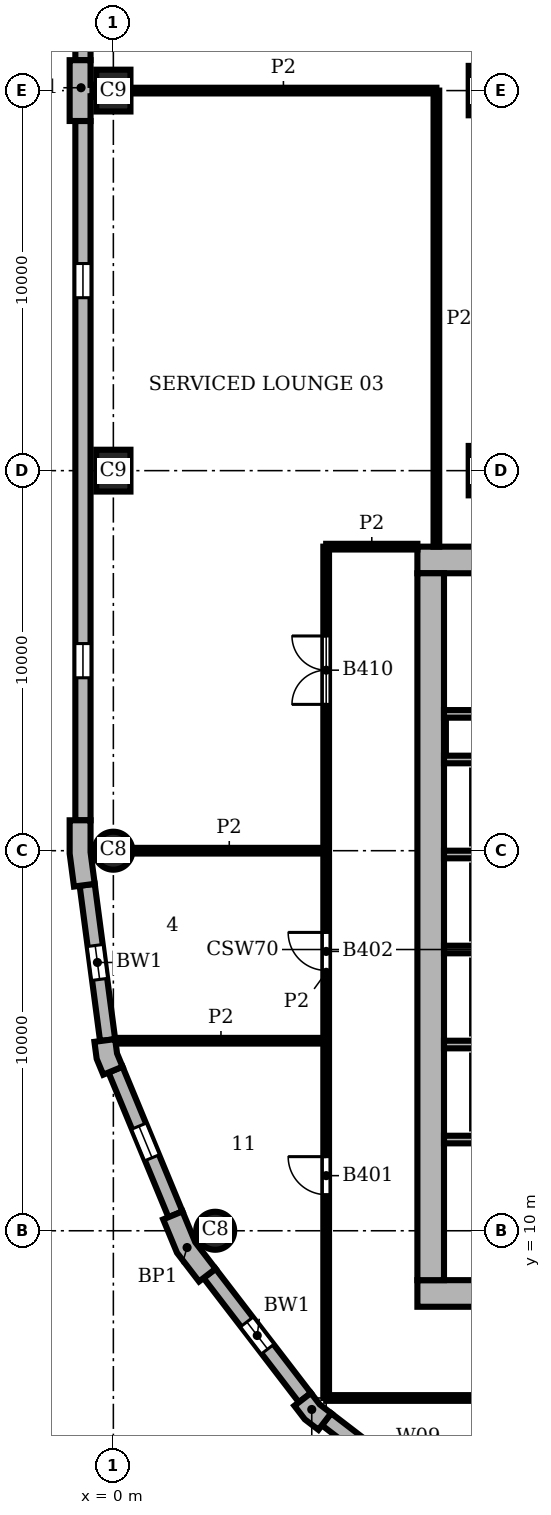
"""IFC4 building model, lengths in metres.
Left out: names, types, materials, properties, quantities, classifications, styles, units other than length and angle.
Written with IfcOpenShell. Run it as: python <this file> out.ifc"""

import sys

from ifc_helpers import new_model, si_unit, direction, frame, frame_2d, origin, origin_2d, place, context, subcontext, project, spatial, polyline, rectangle, circle, outline, extrude, element, fill, save


model = new_model("IFC4")
c1 = context("Model", 3, precision=1e-05, world=origin(), true_north=direction((0.0, 1.0)))
c2 = subcontext(c1, "Body", "Model", "MODEL_VIEW")
j1 = project(units=[si_unit("LENGTHUNIT", "METRE"), si_unit("PLANEANGLEUNIT", "RADIAN")], contexts=[c1])
p1 = place(None, origin())
s1 = spatial("IfcSite", under=j1, at=p1, CompositionType="ELEMENT")
p2 = place(p1, origin())
s2 = spatial("IfcBuilding", under=s1, at=p2, CompositionType="ELEMENT")
p3 = place(p2, frame((0.0, 0.0, 170.7)))
s3 = spatial("IfcBuildingStorey", under=s2, at=p3, CompositionType="ELEMENT", Elevation=170.7)
for number, where, z_axis, x_axis in (
    (1, (0.0, 40.0, 0.0), (0.0, 0.0, 1.0), (0.0, 1.0, 0.0)),
    (2, (0.0, 30.0, 0.0), (0.0, 0.0, 1.0), (0.0, 1.0, 0.0)),
):
    element("IfcColumn", number, at=place(p3, frame(where, z_axis=z_axis, x_axis=x_axis)), inside=s3, PredefinedType="COLUMN", context=c2, shape_type="SweptSolid", body=[
        extrude(rectangle(XDim=1.1, YDim=0.9, at=origin_2d()), origin(), (0.0, 0.0, 1.0), 3.9),
    ])
for number, where, z_axis, x_axis in (
    (3, (0.0, 20.0, 0.0), (0.0, 0.0, 1.0), (1.0, 0.0, 0.0)),
    (4, (2.679, 10.0, 0.0), (0.0, 0.0, 1.0), (1.0, 0.0, 0.0)),
):
    element("IfcColumn", number, at=place(p3, frame(where, z_axis=z_axis, x_axis=x_axis)), inside=s3, PredefinedType="COLUMN", context=c2, shape_type="SweptSolid", body=[
        extrude(circle(Radius=0.5, at=origin_2d()), origin(), (0.0, 0.0, 1.0), 3.9),
    ])
for number, where, z_axis, x_axis in (
    (5, (10.0, 30.0, 0.0), (0.0, 0.0, 1.0), (1.0, 0.0, 0.0)),
    (6, (10.0, 40.0, 0.0), (0.0, 0.0, 1.0), (1.0, 0.0, 0.0)),
):
    element("IfcColumn", number, at=place(p3, frame(where, z_axis=z_axis, x_axis=x_axis)), inside=s3, PredefinedType="COLUMN", context=c2, shape_type="SweptSolid", body=[
        extrude(rectangle(XDim=1.3, YDim=1.3, at=origin_2d()), origin(), (0.0, 0.0, 1.0), 3.9),
    ])
for number, where, z_axis, x_axis in (
    (7, (8.0, 8.35, 0.0), (0.0, 0.0, 1.0), (1.0, 0.0, 0.0)),
    (8, (28.0, 27.65, 0.0), (0.0, 0.0, 1.0), (-1.0, 0.0, 0.0)),
):
    element("IfcWall", number, at=place(p3, frame(where, z_axis=z_axis, x_axis=x_axis)), inside=s3, PredefinedType="SHEAR", context=c2, shape_type="SweptSolid", body=[
        extrude(rectangle(XDim=20.0, YDim=0.7, at=frame_2d((10.0, 0.0))), origin(), (0.0, 0.0, 1.0), 3.9),
    ])
p4 = place(p3, frame((8.35, 27.3, 0.0), z_axis=(0.0, 0.0, 1.0), x_axis=(0.0, -1.0, 0.0)))
e9 = element("IfcWall", 9, at=p4, inside=s3, PredefinedType="SHEAR", context=c2, shape_type="SweptSolid", body=[
    extrude(rectangle(XDim=18.6, YDim=0.7, at=frame_2d((9.3, 0.0))), origin(), (0.0, 0.0, 1.0), 3.9),
])
p5 = place(p3, origin())
e10 = element("IfcWall", 10, at=p5, inside=s3, PredefinedType="SOLIDWALL", context=c2, shape_type="SweptSolid", body=[
    extrude(outline(polyline([(-0.6, 39.2), (-0.6, 39.85), (-0.55, 39.85), (-0.55, 40.15), (-0.6, 40.15), (-0.6, 40.8), (-1.0, 40.8), (-1.15, 40.8), (-1.15, 40.0), (-1.15, 39.2), (-1.0, 39.2), (-0.6, 39.2)])), origin(), (0.0, 0.0, 1.0), 3.9),
])
e11 = element("IfcWall", 11, at=p5, inside=s3, PredefinedType="SOLIDWALL", context=c2, shape_type="SweptSolid", body=[
    extrude(outline(polyline([(-1.0, 20.8), (-1.15, 20.8), (-1.15, 19.925), (-1.036, 19.057), (-0.887, 19.076), (-0.49, 19.128), (-0.6, 19.961), (-0.6, 20.8), (-1.0, 20.8)])), origin(), (0.0, 0.0, 1.0), 3.9),
])
e12 = element("IfcWall", 12, at=p5, inside=s3, PredefinedType="SOLIDWALL", context=c2, shape_type="SweptSolid", body=[
    extrude(outline(polyline([(-0.349, 14.99), (-0.498, 14.971), (-0.439, 14.523), (-0.266, 14.106), (-0.128, 14.164), (0.242, 14.317), (0.097, 14.667), (0.047, 15.043), (-0.349, 14.99)])), origin(), (0.0, 0.0, 1.0), 3.9),
])
e13 = element("IfcWall", 13, at=p5, inside=s3, PredefinedType="SOLIDWALL", context=c2, shape_type="SweptSolid", body=[
    extrude(outline(polyline([(1.449, 10.356), (1.311, 10.299), (1.675, 9.42), (2.254, 8.665), (2.373, 8.757), (2.69, 9.0), (2.155, 9.698), (1.819, 10.51), (1.449, 10.356)])), origin(), (0.0, 0.0, 1.0), 3.9),
])
e14 = element("IfcWall", 14, at=p5, inside=s3, PredefinedType="SOLIDWALL", context=c2, shape_type="SweptSolid", body=[
    extrude(outline(polyline([(4.882, 5.487), (4.763, 5.396), (5.038, 5.038), (5.396, 4.763), (5.487, 4.882), (5.731, 5.199), (5.43, 5.43), (5.199, 5.731), (4.882, 5.487)])), origin(), (0.0, 0.0, 1.0), 3.9),
])
p6 = place(p3, frame((-0.8, 59.2, 0.0), z_axis=(0.0, 0.0, 1.0), x_axis=(0.0, -1.0, 0.0)))
e15 = element("IfcWall", 15, at=p6, inside=s3, PredefinedType="SOLIDWALL", context=c2, shape_type="SweptSolid", body=[
    extrude(rectangle(XDim=18.4, YDim=0.4, at=frame_2d((9.2, 0.0))), origin(), (0.0, 0.0, 1.0), 3.9),
])
p7 = place(p6, frame((3.75, 0.0, 0.9)))
e16 = element("IfcOpeningElement", 16, at=p7, cuts=e15, PredefinedType="OPENING", context=c2, shape_type="SweptSolid", body=[
    extrude(rectangle(XDim=0.9, YDim=2.35, at=frame_2d((0.45, 1.175))), frame((0.0, 0.21, 0.0), z_axis=(0.0, -1.0, 0.0), x_axis=(1.0, 0.0, 0.0)), (0.0, 0.0, 1.0), 0.42),
])
p8 = place(p6, frame((13.75, 0.0, 0.9)))
e17 = element("IfcOpeningElement", 17, at=p8, cuts=e15, PredefinedType="OPENING", context=c2, shape_type="SweptSolid", body=[
    extrude(rectangle(XDim=0.9, YDim=2.35, at=frame_2d((0.45, 1.175))), frame((0.0, 0.21, 0.0), z_axis=(0.0, -1.0, 0.0), x_axis=(1.0, 0.0, 0.0)), (0.0, 0.0, 1.0), 0.42),
])
p9 = place(p3, frame((-0.8, 39.2, 0.0), z_axis=(0.0, 0.0, 1.0), x_axis=(0.0, -1.0, 0.0)))
e18 = element("IfcWall", 18, at=p9, inside=s3, PredefinedType="SOLIDWALL", context=c2, shape_type="SweptSolid", body=[
    extrude(rectangle(XDim=18.4, YDim=0.4, at=frame_2d((9.2, 0.0))), origin(), (0.0, 0.0, 1.0), 3.9),
])
p10 = place(p9, frame((3.75, 0.0, 0.9)))
e19 = element("IfcOpeningElement", 19, at=p10, cuts=e18, PredefinedType="OPENING", context=c2, shape_type="SweptSolid", body=[
    extrude(rectangle(XDim=0.9, YDim=2.35, at=frame_2d((0.45, 1.175))), frame((0.0, 0.21, 0.0), z_axis=(0.0, -1.0, 0.0), x_axis=(1.0, 0.0, 0.0)), (0.0, 0.0, 1.0), 0.42),
])
p11 = place(p9, frame((13.75, 0.0, 0.9)))
e20 = element("IfcOpeningElement", 20, at=p11, cuts=e18, PredefinedType="OPENING", context=c2, shape_type="SweptSolid", body=[
    extrude(rectangle(XDim=0.9, YDim=2.35, at=frame_2d((0.45, 1.175))), frame((0.0, 0.21, 0.0), z_axis=(0.0, -1.0, 0.0), x_axis=(1.0, 0.0, 0.0)), (0.0, 0.0, 1.0), 0.42),
])
p12 = place(p3, frame((-0.689, 19.102, 0.0), z_axis=(0.0, 0.0, 1.0), x_axis=(0.130514280502, -0.991446429508, 0.0)))
e21 = element("IfcWall", 21, at=p12, inside=s3, PredefinedType="SOLIDWALL", context=c2, shape_type="SweptSolid", body=[
    extrude(rectangle(XDim=4.121, YDim=0.4, at=frame_2d((2.061, 0.0))), origin(), (0.0, 0.0, 1.0), 3.9),
])
p13 = place(p12, frame((1.611, 0.0, 0.9)))
e22 = element("IfcOpeningElement", 22, at=p13, cuts=e21, PredefinedType="OPENING", context=c2, shape_type="SweptSolid", body=[
    extrude(rectangle(XDim=0.9, YDim=2.35, at=frame_2d((0.45, 1.175))), frame((0.0, 0.21, 0.0), z_axis=(0.0, -1.0, 0.0), x_axis=(1.0, 0.0, 0.0)), (0.0, 0.0, 1.0), 0.42),
])
p14 = place(p3, frame((0.057, 14.24, 0.0), z_axis=(0.0, 0.0, 1.0), x_axis=(0.382721546029, -0.923863744394, 0.0)))
e23 = element("IfcWall", 23, at=p14, inside=s3, PredefinedType="SOLIDWALL", context=c2, shape_type="SweptSolid", body=[
    extrude(rectangle(XDim=4.121, YDim=0.4, at=frame_2d((2.061, 0.0))), origin(), (0.0, 0.0, 1.0), 3.9),
])
p15 = place(p14, frame((1.611, 0.0, 0.9)))
e24 = element("IfcOpeningElement", 24, at=p15, cuts=e23, PredefinedType="OPENING", context=c2, shape_type="SweptSolid", body=[
    extrude(rectangle(XDim=0.9, YDim=2.35, at=frame_2d((0.45, 1.175))), frame((0.0, 0.21, 0.0), z_axis=(0.0, -1.0, 0.0), x_axis=(1.0, 0.0, 0.0)), (0.0, 0.0, 1.0), 0.42),
])
p16 = place(p3, frame((2.532, 8.878, 0.0), z_axis=(0.0, 0.0, 1.0), x_axis=(0.608759824817, -0.793354571229, 0.0)))
e25 = element("IfcWall", 25, at=p16, inside=s3, PredefinedType="SOLIDWALL", context=c2, shape_type="SweptSolid", body=[
    extrude(rectangle(XDim=4.121, YDim=0.4, at=frame_2d((2.061, 0.0))), origin(), (0.0, 0.0, 1.0), 3.9),
])
p17 = place(p16, frame((1.611, 0.0, 0.9)))
e26 = element("IfcOpeningElement", 26, at=p17, cuts=e25, PredefinedType="OPENING", context=c2, shape_type="SweptSolid", body=[
    extrude(rectangle(XDim=0.9, YDim=2.35, at=frame_2d((0.45, 1.175))), frame((0.0, 0.21, 0.0), z_axis=(0.0, -1.0, 0.0), x_axis=(1.0, 0.0, 0.0)), (0.0, 0.0, 1.0), 0.42),
])
p18 = place(p3, frame((5.609, 5.041, 0.0), z_axis=(0.0, 0.0, 1.0), x_axis=(0.793354571229, -0.608759824817, 0.0)))
e27 = element("IfcWall", 27, at=p18, inside=s3, PredefinedType="SOLIDWALL", context=c2, shape_type="SweptSolid", body=[
    extrude(rectangle(XDim=4.121, YDim=0.4, at=frame_2d((2.061, 0.0))), origin(), (0.0, 0.0, 1.0), 3.9),
])
p19 = place(p18, frame((1.611, 0.0, 0.9)))
e28 = element("IfcOpeningElement", 28, at=p19, cuts=e27, PredefinedType="OPENING", context=c2, shape_type="SweptSolid", body=[
    extrude(rectangle(XDim=0.9, YDim=2.35, at=frame_2d((0.45, 1.175))), frame((0.0, 0.21, 0.0), z_axis=(0.0, -1.0, 0.0), x_axis=(1.0, 0.0, 0.0)), (0.0, 0.0, 1.0), 0.42),
])
p20 = place(p3, frame((8.7, 12.4, 0.0), z_axis=(0.0, 0.0, 1.0), x_axis=(1.0, 0.0, 0.0)))
e29 = element("IfcWall", 29, at=p20, inside=s3, PredefinedType="SHEAR", context=c2, shape_type="SweptSolid", body=[
    extrude(rectangle(XDim=5.1, YDim=0.2, at=frame_2d((2.55, 0.0))), origin(), (0.0, 0.0, 1.0), 3.58),
])
for number, where, z_axis, x_axis in (
    (30, (8.7, 14.9, 0.0), (0.0, 0.0, 1.0), (1.0, 0.0, 0.0)),
    (31, (8.7, 17.4, 0.0), (0.0, 0.0, 1.0), (1.0, 0.0, 0.0)),
    (32, (8.7, 19.9, 0.0), (0.0, 0.0, 1.0), (1.0, 0.0, 0.0)),
    (33, (8.7, 22.4, 0.0), (0.0, 0.0, 1.0), (1.0, 0.0, 0.0)),
):
    element("IfcWall", number, at=place(p3, frame(where, z_axis=z_axis, x_axis=x_axis)), inside=s3, PredefinedType="SHEAR", context=c2, shape_type="SweptSolid", body=[
        extrude(rectangle(XDim=3.0, YDim=0.2, at=frame_2d((1.5, 0.0))), origin(), (0.0, 0.0, 1.0), 3.58),
    ])
p21 = place(p3, frame((8.7, 23.6, 0.0), z_axis=(0.0, 0.0, 1.0), x_axis=(1.0, 0.0, 0.0)))
e34 = element("IfcWall", 34, at=p21, inside=s3, PredefinedType="SHEAR", context=c2, shape_type="SweptSolid", body=[
    extrude(rectangle(XDim=5.1, YDim=0.2, at=frame_2d((2.55, 0.0))), origin(), (0.0, 0.0, 1.0), 3.58),
])
p22 = place(p3, frame((5.6, 5.6, 0.0), z_axis=(0.0, 0.0, 1.0), x_axis=(0.0, 1.0, 0.0)))
e35 = element("IfcWall", 35, at=p22, inside=s3, PredefinedType="PARTITIONING", context=c2, shape_type="SweptSolid", body=[
    extrude(rectangle(XDim=22.4, YDim=0.15, at=frame_2d((11.2, 0.0))), origin(), (0.0, 0.0, 1.0), 3.58),
])
p23 = place(p22, frame((5.35, 0.0, 0.0)))
e36 = element("IfcOpeningElement", 36, at=p23, cuts=e35, PredefinedType="OPENING", context=c2, shape_type="SweptSolid", body=[
    extrude(rectangle(XDim=1.0, YDim=2.1, at=frame_2d((0.5, 1.05))), frame((0.0, 0.085, 0.0), z_axis=(0.0, -1.0, 0.0), x_axis=(1.0, 0.0, 0.0)), (0.0, 0.0, 1.0), 0.17),
])
p24 = place(p22, frame((11.25, 0.0, 0.0)))
e37 = element("IfcOpeningElement", 37, at=p24, cuts=e35, PredefinedType="OPENING", context=c2, shape_type="SweptSolid", body=[
    extrude(rectangle(XDim=1.0, YDim=2.1, at=frame_2d((0.5, 1.05))), frame((0.0, 0.085, 0.0), z_axis=(0.0, -1.0, 0.0), x_axis=(1.0, 0.0, 0.0)), (0.0, 0.0, 1.0), 0.17),
])
p25 = place(p22, frame((18.25, 0.0, 0.0)))
e38 = element("IfcOpeningElement", 38, at=p25, cuts=e35, PredefinedType="OPENING", context=c2, shape_type="SweptSolid", body=[
    extrude(rectangle(XDim=1.8, YDim=2.1, at=frame_2d((0.9, 1.05))), frame((0.0, 0.085, 0.0), z_axis=(0.0, -1.0, 0.0), x_axis=(1.0, 0.0, 0.0)), (0.0, 0.0, 1.0), 0.17),
])
p26 = place(p3, frame((8.5, 28.0, 0.0), z_axis=(0.0, 0.0, 1.0), x_axis=(0.0, 1.0, 0.0)))
e39 = element("IfcWall", 39, at=p26, inside=s3, PredefinedType="PARTITIONING", context=c2, shape_type="SweptSolid", body=[
    extrude(rectangle(XDim=12.0, YDim=0.15, at=frame_2d((6.0, 0.0))), origin(), (0.0, 0.0, 1.0), 3.58),
])
p27 = place(p3, frame((5.6, 5.6, 0.0), z_axis=(0.0, 0.0, 1.0), x_axis=(1.0, 0.0, 0.0)))
e40 = element("IfcWall", 40, at=p27, inside=s3, PredefinedType="PARTITIONING", context=c2, shape_type="SweptSolid", body=[
    extrude(rectangle(XDim=25.4, YDim=0.15, at=frame_2d((12.7, 0.0))), origin(), (0.0, 0.0, 1.0), 3.58),
])
p28 = place(p27, frame((5.6, 0.0, 0.0)))
e41 = element("IfcOpeningElement", 41, at=p28, cuts=e40, PredefinedType="OPENING", context=c2, shape_type="SweptSolid", body=[
    extrude(rectangle(XDim=1.0, YDim=2.1, at=frame_2d((0.5, 1.05))), frame((0.0, 0.085, 0.0), z_axis=(0.0, -1.0, 0.0), x_axis=(1.0, 0.0, 0.0)), (0.0, 0.0, 1.0), 0.17),
])
p29 = place(p27, frame((11.0, 0.0, 0.0)))
e42 = element("IfcOpeningElement", 42, at=p29, cuts=e40, PredefinedType="OPENING", context=c2, shape_type="SweptSolid", body=[
    extrude(rectangle(XDim=1.0, YDim=2.1, at=frame_2d((0.5, 1.05))), frame((0.0, 0.085, 0.0), z_axis=(0.0, -1.0, 0.0), x_axis=(1.0, 0.0, 0.0)), (0.0, 0.0, 1.0), 0.17),
])
p30 = place(p27, frame((18.75, 0.0, 0.0)))
e43 = element("IfcOpeningElement", 43, at=p30, cuts=e40, PredefinedType="OPENING", context=c2, shape_type="SweptSolid", body=[
    extrude(rectangle(XDim=1.0, YDim=2.1, at=frame_2d((0.5, 1.05))), frame((0.0, 0.085, 0.0), z_axis=(0.0, -1.0, 0.0), x_axis=(1.0, 0.0, 0.0)), (0.0, 0.0, 1.0), 0.17),
])
p31 = place(p3, frame((0.063, 15.0, 0.0), z_axis=(0.0, 0.0, 1.0), x_axis=(1.0, 0.0, 0.0)))
e44 = element("IfcWall", 44, at=p31, inside=s3, PredefinedType="PARTITIONING", context=c2, shape_type="SweptSolid", body=[
    extrude(rectangle(XDim=5.537, YDim=0.15, at=frame_2d((2.769, 0.0))), origin(), (0.0, 0.0, 1.0), 3.58),
])
p32 = place(p3, frame((0.5, 20.0, 0.0), z_axis=(0.0, 0.0, 1.0), x_axis=(1.0, 0.0, 0.0)))
e45 = element("IfcWall", 45, at=p32, inside=s3, PredefinedType="PARTITIONING", context=c2, shape_type="SweptSolid", body=[
    extrude(rectangle(XDim=5.1, YDim=0.15, at=frame_2d((2.55, 0.0))), origin(), (0.0, 0.0, 1.0), 3.58),
])
p33 = place(p3, frame((5.6, 28.0, 0.0), z_axis=(0.0, 0.0, 1.0), x_axis=(1.0, 0.0, 0.0)))
e46 = element("IfcWall", 46, at=p33, inside=s3, PredefinedType="PARTITIONING", context=c2, shape_type="SweptSolid", body=[
    extrude(rectangle(XDim=2.4, YDim=0.15, at=frame_2d((1.2, 0.0))), origin(), (0.0, 0.0, 1.0), 3.58),
])
p34 = place(p3, frame((0.45, 40.0, 0.0), z_axis=(0.0, 0.0, 1.0), x_axis=(1.0, 0.0, 0.0)))
e47 = element("IfcWall", 47, at=p34, inside=s3, PredefinedType="PARTITIONING", context=c2, shape_type="SweptSolid", body=[
    extrude(rectangle(XDim=8.05, YDim=0.15, at=frame_2d((4.025, 0.0))), origin(), (0.0, 0.0, 1.0), 3.58),
])
p35 = place(p10, origin())
e48 = element("IfcWindow", 48, at=p35, inside=s3, PartitioningType="SINGLE_PANEL", PredefinedType="WINDOW", context=c2, shape_type="SweptSolid", body=[
    extrude(rectangle(XDim=0.9, YDim=2.35, at=frame_2d((0.45, 1.175))), frame((0.0, 0.16, 0.0), z_axis=(0.0, -1.0, 0.0), x_axis=(1.0, 0.0, 0.0)), (0.0, 0.0, 1.0), 0.06),
])
fill(e19, e48)
p36 = place(p11, origin())
e49 = element("IfcWindow", 49, at=p36, inside=s3, PartitioningType="SINGLE_PANEL", PredefinedType="WINDOW", context=c2, shape_type="SweptSolid", body=[
    extrude(rectangle(XDim=0.9, YDim=2.35, at=frame_2d((0.45, 1.175))), frame((0.0, 0.16, 0.0), z_axis=(0.0, -1.0, 0.0), x_axis=(1.0, 0.0, 0.0)), (0.0, 0.0, 1.0), 0.06),
])
fill(e20, e49)
p37 = place(p13, origin())
e50 = element("IfcWindow", 50, at=p37, inside=s3, PartitioningType="SINGLE_PANEL", PredefinedType="WINDOW", context=c2, shape_type="SweptSolid", body=[
    extrude(rectangle(XDim=0.9, YDim=2.35, at=frame_2d((0.45, 1.175))), frame((0.0, 0.16, 0.0), z_axis=(0.0, -1.0, 0.0), x_axis=(1.0, 0.0, 0.0)), (0.0, 0.0, 1.0), 0.06),
])
fill(e22, e50)
p38 = place(p15, origin())
e51 = element("IfcWindow", 51, at=p38, inside=s3, PartitioningType="SINGLE_PANEL", PredefinedType="WINDOW", context=c2, shape_type="SweptSolid", body=[
    extrude(rectangle(XDim=0.9, YDim=2.35, at=frame_2d((0.45, 1.175))), frame((0.0, 0.16, 0.0), z_axis=(0.0, -1.0, 0.0), x_axis=(1.0, 0.0, 0.0)), (0.0, 0.0, 1.0), 0.06),
])
fill(e24, e51)
p39 = place(p17, origin())
e52 = element("IfcWindow", 52, at=p39, inside=s3, PartitioningType="SINGLE_PANEL", PredefinedType="WINDOW", context=c2, shape_type="SweptSolid", body=[
    extrude(rectangle(XDim=0.9, YDim=2.35, at=frame_2d((0.45, 1.175))), frame((0.0, 0.16, 0.0), z_axis=(0.0, -1.0, 0.0), x_axis=(1.0, 0.0, 0.0)), (0.0, 0.0, 1.0), 0.06),
])
fill(e26, e52)
p40 = place(p23, origin())
e53 = element("IfcDoor", 53, at=p40, inside=s3, OperationType="SINGLE_SWING_RIGHT", PredefinedType="DOOR", context=c2, shape_type="SweptSolid", body=[
    extrude(rectangle(XDim=1.0, YDim=2.1, at=frame_2d((0.5, 1.05))), frame((0.0, 0.025, 0.0), z_axis=(0.0, -1.0, 0.0), x_axis=(1.0, 0.0, 0.0)), (0.0, 0.0, 1.0), 0.05),
])
fill(e36, e53)
p41 = place(p24, origin())
e54 = element("IfcDoor", 54, at=p41, inside=s3, OperationType="SINGLE_SWING_RIGHT", PredefinedType="DOOR", context=c2, shape_type="SweptSolid", body=[
    extrude(rectangle(XDim=1.0, YDim=2.1, at=frame_2d((0.5, 1.05))), frame((0.0, 0.025, 0.0), z_axis=(0.0, -1.0, 0.0), x_axis=(1.0, 0.0, 0.0)), (0.0, 0.0, 1.0), 0.05),
])
fill(e37, e54)
p42 = place(p25, origin())
e55 = element("IfcDoor", 55, at=p42, inside=s3, OperationType="DOUBLE_DOOR_SINGLE_SWING", PredefinedType="DOOR", context=c2, shape_type="SweptSolid", body=[
    extrude(rectangle(XDim=1.8, YDim=2.1, at=frame_2d((0.9, 1.05))), frame((0.0, 0.025, 0.0), z_axis=(0.0, -1.0, 0.0), x_axis=(1.0, 0.0, 0.0)), (0.0, 0.0, 1.0), 0.05),
])
fill(e38, e55)
save(model, sys.argv[1])
